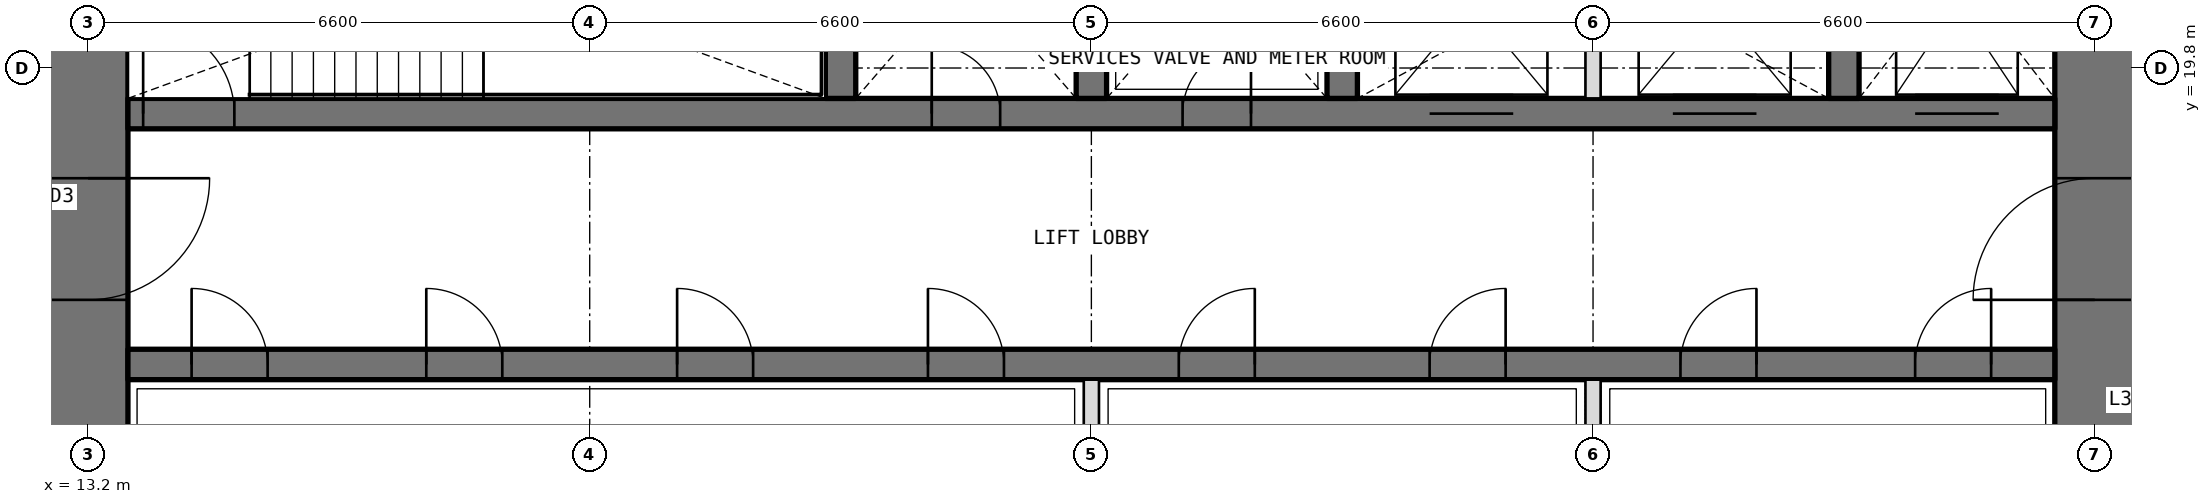
"""IFC4 building model, lengths in metres.
Left out: names, types, materials, properties, quantities, classifications, styles, units other than length and angle.
Written with IfcOpenShell. Run it as: python <this file> out.ifc"""

import sys

from ifc_helpers import new_model, si_unit, direction, frame, frame_2d, origin, place, context, subcontext, project, spatial, rectangle, extrude, element, fill, save


model = new_model("IFC4")
c1 = context("Model", 3, precision=1e-05, world=origin(), true_north=direction((0.0, 1.0)))
c2 = subcontext(c1, "Body", "Model", "MODEL_VIEW")
j1 = project(units=[si_unit("LENGTHUNIT", "METRE"), si_unit("PLANEANGLEUNIT", "RADIAN")], contexts=[c1])
p1 = place(None, origin())
s1 = spatial("IfcSite", under=j1, at=p1, CompositionType="ELEMENT")
p2 = place(p1, origin())
s2 = spatial("IfcBuilding", under=s1, at=p2, CompositionType="ELEMENT")
p3 = place(p2, frame((0.0, 0.0, 168.3)))
s3 = spatial("IfcBuildingStorey", under=s2, at=p3, CompositionType="ELEMENT", Elevation=168.3)
p4 = place(p3, frame((39.6, 13.725, 0.0), z_axis=(0.0, 0.0, 1.0), x_axis=(0.0, 1.0, 0.0)))
e1 = element("IfcWall", 1, at=p4, inside=s3, PredefinedType="SHEAR", context=c2, shape_type="SweptSolid", body=[
    extrude(rectangle(XDim=18.75, YDim=1.05, at=frame_2d((9.375, 0.0))), origin(), (0.0, 0.0, 1.0), 4.2),
])
p5 = place(p4, frame((3.025, 0.0, 0.0)))
e2 = element("IfcOpeningElement", 2, at=p5, cuts=e1, PredefinedType="OPENING", context=c2, shape_type="SweptSolid", body=[
    extrude(rectangle(XDim=1.6, YDim=2.1, at=frame_2d((0.8, 1.05))), frame((0.0, 0.535, 0.0), z_axis=(0.0, -1.0, 0.0), x_axis=(1.0, 0.0, 0.0)), (0.0, 0.0, 1.0), 1.07),
])
p6 = place(p4, frame((13.825, 0.0, 0.0)))
e3 = element("IfcOpeningElement", 3, at=p6, cuts=e1, PredefinedType="OPENING", context=c2, shape_type="SweptSolid", body=[
    extrude(rectangle(XDim=1.6, YDim=2.1, at=frame_2d((0.8, 1.05))), frame((0.0, 0.535, 0.0), z_axis=(0.0, -1.0, 0.0), x_axis=(1.0, 0.0, 0.0)), (0.0, 0.0, 1.0), 1.07),
])
p7 = place(p3, frame((13.2, 32.475, 0.0), z_axis=(0.0, 0.0, 1.0), x_axis=(0.0, -1.0, 0.0)))
e4 = element("IfcWall", 4, at=p7, inside=s3, PredefinedType="SHEAR", context=c2, shape_type="SweptSolid", body=[
    extrude(rectangle(XDim=18.75, YDim=1.05, at=frame_2d((9.375, 0.0))), origin(), (0.0, 0.0, 1.0), 4.2),
])
p8 = place(p7, frame((14.125, 0.0, 0.0)))
e5 = element("IfcOpeningElement", 5, at=p8, cuts=e4, PredefinedType="OPENING", context=c2, shape_type="SweptSolid", body=[
    extrude(rectangle(XDim=1.6, YDim=2.1, at=frame_2d((0.8, 1.05))), frame((0.0, 0.535, 0.0), z_axis=(0.0, -1.0, 0.0), x_axis=(1.0, 0.0, 0.0)), (0.0, 0.0, 1.0), 1.07),
])
p9 = place(p7, frame((3.325, 0.0, 0.0)))
e6 = element("IfcOpeningElement", 6, at=p9, cuts=e4, PredefinedType="OPENING", context=c2, shape_type="SweptSolid", body=[
    extrude(rectangle(XDim=1.6, YDim=2.1, at=frame_2d((0.8, 1.05))), frame((0.0, 0.535, 0.0), z_axis=(0.0, -1.0, 0.0), x_axis=(1.0, 0.0, 0.0)), (0.0, 0.0, 1.0), 1.07),
])
p10 = place(p3, frame((13.725, 15.9, 0.0), z_axis=(0.0, 0.0, 1.0), x_axis=(1.0, 0.0, 0.0)))
e7 = element("IfcWall", 7, at=p10, inside=s3, PredefinedType="SHEAR", context=c2, shape_type="SweptSolid", body=[
    extrude(rectangle(XDim=25.35, YDim=0.4, at=frame_2d((12.675, 0.0))), origin(), (0.0, 0.0, 1.0), 4.2),
])
p11 = place(p10, frame((0.837, 0.0, 0.0)))
e8 = element("IfcOpeningElement", 8, at=p11, cuts=e7, PredefinedType="OPENING", context=c2, shape_type="SweptSolid", body=[
    extrude(rectangle(XDim=1.0, YDim=2.1, at=frame_2d((0.5, 1.05))), frame((0.0, 0.21, 0.0), z_axis=(0.0, -1.0, 0.0), x_axis=(1.0, 0.0, 0.0)), (0.0, 0.0, 1.0), 0.42),
])
p12 = place(p10, frame((3.925, 0.0, 0.0)))
e9 = element("IfcOpeningElement", 9, at=p12, cuts=e7, PredefinedType="OPENING", context=c2, shape_type="SweptSolid", body=[
    extrude(rectangle(XDim=1.0, YDim=2.1, at=frame_2d((0.5, 1.05))), frame((0.0, 0.21, 0.0), z_axis=(0.0, -1.0, 0.0), x_axis=(1.0, 0.0, 0.0)), (0.0, 0.0, 1.0), 0.42),
])
p13 = place(p10, frame((7.225, 0.0, 0.0)))
e10 = element("IfcOpeningElement", 10, at=p13, cuts=e7, PredefinedType="OPENING", context=c2, shape_type="SweptSolid", body=[
    extrude(rectangle(XDim=1.0, YDim=2.1, at=frame_2d((0.5, 1.05))), frame((0.0, 0.21, 0.0), z_axis=(0.0, -1.0, 0.0), x_axis=(1.0, 0.0, 0.0)), (0.0, 0.0, 1.0), 0.42),
])
p14 = place(p10, frame((10.525, 0.0, 0.0)))
e11 = element("IfcOpeningElement", 11, at=p14, cuts=e7, PredefinedType="OPENING", context=c2, shape_type="SweptSolid", body=[
    extrude(rectangle(XDim=1.0, YDim=2.1, at=frame_2d((0.5, 1.05))), frame((0.0, 0.21, 0.0), z_axis=(0.0, -1.0, 0.0), x_axis=(1.0, 0.0, 0.0)), (0.0, 0.0, 1.0), 0.42),
])
p15 = place(p10, frame((13.825, 0.0, 0.0)))
e12 = element("IfcOpeningElement", 12, at=p15, cuts=e7, PredefinedType="OPENING", context=c2, shape_type="SweptSolid", body=[
    extrude(rectangle(XDim=1.0, YDim=2.1, at=frame_2d((0.5, 1.05))), frame((0.0, 0.21, 0.0), z_axis=(0.0, -1.0, 0.0), x_axis=(1.0, 0.0, 0.0)), (0.0, 0.0, 1.0), 0.42),
])
p16 = place(p10, frame((17.125, 0.0, 0.0)))
e13 = element("IfcOpeningElement", 13, at=p16, cuts=e7, PredefinedType="OPENING", context=c2, shape_type="SweptSolid", body=[
    extrude(rectangle(XDim=1.0, YDim=2.1, at=frame_2d((0.5, 1.05))), frame((0.0, 0.21, 0.0), z_axis=(0.0, -1.0, 0.0), x_axis=(1.0, 0.0, 0.0)), (0.0, 0.0, 1.0), 0.42),
])
p17 = place(p10, frame((20.425, 0.0, 0.0)))
e14 = element("IfcOpeningElement", 14, at=p17, cuts=e7, PredefinedType="OPENING", context=c2, shape_type="SweptSolid", body=[
    extrude(rectangle(XDim=1.0, YDim=2.1, at=frame_2d((0.5, 1.05))), frame((0.0, 0.21, 0.0), z_axis=(0.0, -1.0, 0.0), x_axis=(1.0, 0.0, 0.0)), (0.0, 0.0, 1.0), 0.42),
])
p18 = place(p10, frame((23.512, 0.0, 0.0)))
e15 = element("IfcOpeningElement", 15, at=p18, cuts=e7, PredefinedType="OPENING", context=c2, shape_type="SweptSolid", body=[
    extrude(rectangle(XDim=1.0, YDim=2.1, at=frame_2d((0.5, 1.05))), frame((0.0, 0.21, 0.0), z_axis=(0.0, -1.0, 0.0), x_axis=(1.0, 0.0, 0.0)), (0.0, 0.0, 1.0), 0.42),
])
p19 = place(p3, frame((13.725, 19.2, 0.0), z_axis=(0.0, 0.0, 1.0), x_axis=(1.0, 0.0, 0.0)))
e16 = element("IfcWall", 16, at=p19, inside=s3, PredefinedType="SHEAR", context=c2, shape_type="SweptSolid", body=[
    extrude(rectangle(XDim=25.35, YDim=0.4, at=frame_2d((12.675, 0.0))), origin(), (0.0, 0.0, 1.0), 4.2),
])
p20 = place(p19, frame((10.575, 0.0, 0.0)))
e17 = element("IfcOpeningElement", 17, at=p20, cuts=e16, PredefinedType="OPENING", context=c2, shape_type="SweptSolid", body=[
    extrude(rectangle(XDim=0.9, YDim=2.1, at=frame_2d((0.45, 1.05))), frame((0.0, 0.21, 0.0), z_axis=(0.0, -1.0, 0.0), x_axis=(1.0, 0.0, 0.0)), (0.0, 0.0, 1.0), 0.42),
])
p21 = place(p19, frame((13.875, 0.0, 0.0)))
e18 = element("IfcOpeningElement", 18, at=p21, cuts=e16, PredefinedType="OPENING", context=c2, shape_type="SweptSolid", body=[
    extrude(rectangle(XDim=0.9, YDim=2.1, at=frame_2d((0.45, 1.05))), frame((0.0, 0.21, 0.0), z_axis=(0.0, -1.0, 0.0), x_axis=(1.0, 0.0, 0.0)), (0.0, 0.0, 1.0), 0.42),
])
p22 = place(p19, frame((0.2, 0.0, 0.0)))
e19 = element("IfcOpeningElement", 19, at=p22, cuts=e16, PredefinedType="OPENING", context=c2, shape_type="SweptSolid", body=[
    extrude(rectangle(XDim=1.2, YDim=2.1, at=frame_2d((0.6, 1.05))), frame((0.0, 0.21, 0.0), z_axis=(0.0, -1.0, 0.0), x_axis=(1.0, 0.0, 0.0)), (0.0, 0.0, 1.0), 0.42),
])
p23 = place(p19, frame((23.512, 0.0, 0.0)))
e20 = element("IfcOpeningElement", 20, at=p23, cuts=e16, PredefinedType="OPENING", context=c2, shape_type="SweptSolid", body=[
    extrude(rectangle(XDim=1.1, YDim=2.1, at=frame_2d((0.55, 1.05))), frame((0.0, 0.21, 0.0), z_axis=(0.0, -1.0, 0.0), x_axis=(1.0, 0.0, 0.0)), (0.0, 0.0, 1.0), 0.42),
])
p24 = place(p19, frame((17.125, 0.0, 0.0)))
e21 = element("IfcOpeningElement", 21, at=p24, cuts=e16, PredefinedType="OPENING", context=c2, shape_type="SweptSolid", body=[
    extrude(rectangle(XDim=1.1, YDim=2.1, at=frame_2d((0.55, 1.05))), frame((0.0, 0.21, 0.0), z_axis=(0.0, -1.0, 0.0), x_axis=(1.0, 0.0, 0.0)), (0.0, 0.0, 1.0), 0.42),
])
p25 = place(p19, frame((20.325, 0.0, 0.0)))
e22 = element("IfcOpeningElement", 22, at=p25, cuts=e16, PredefinedType="OPENING", context=c2, shape_type="SweptSolid", body=[
    extrude(rectangle(XDim=1.1, YDim=2.1, at=frame_2d((0.55, 1.05))), frame((0.0, 0.21, 0.0), z_axis=(0.0, -1.0, 0.0), x_axis=(1.0, 0.0, 0.0)), (0.0, 0.0, 1.0), 0.42),
])
for number, where, z_axis, x_axis in (
    (23, (23.1, 19.4, 0.0), (0.0, 0.0, 1.0), (0.0, 1.0, 0.0)),
    (24, (26.4, 19.4, 0.0), (0.0, 0.0, 1.0), (0.0, 1.0, 0.0)),
    (25, (29.7, 19.4, 0.0), (0.0, 0.0, 1.0), (0.0, 1.0, 0.0)),
    (26, (36.3, 19.4, 0.0), (0.0, 0.0, 1.0), (0.0, 1.0, 0.0)),
):
    element("IfcWall", number, at=place(p3, frame(where, z_axis=z_axis, x_axis=x_axis)), inside=s3, PredefinedType="SHEAR", context=c2, shape_type="SweptSolid", body=[
        extrude(rectangle(XDim=3.35, YDim=0.4, at=frame_2d((1.675, 0.0))), origin(), (0.0, 0.0, 1.0), 4.2),
    ])
for number, where, z_axis, x_axis in (
    (27, (26.4, 13.725, 0.0), (0.0, 0.0, 1.0), (0.0, 1.0, 0.0)),
    (28, (33.0, 13.725, 0.0), (0.0, 0.0, 1.0), (0.0, 1.0, 0.0)),
):
    element("IfcWall", number, at=place(p3, frame(where, z_axis=z_axis, x_axis=x_axis)), inside=s3, PredefinedType="PARTITIONING", context=c2, shape_type="SweptSolid", body=[
        extrude(rectangle(XDim=1.975, YDim=0.2, at=frame_2d((0.987, 0.0))), origin(), (0.0, 0.0, 1.0), 4.2),
    ])
p26 = place(p3, frame((33.0, 19.4, 0.0), z_axis=(0.0, 0.0, 1.0), x_axis=(0.0, 1.0, 0.0)))
e29 = element("IfcWall", 29, at=p26, inside=s3, PredefinedType="PARTITIONING", context=c2, shape_type="SweptSolid", body=[
    extrude(rectangle(XDim=3.35, YDim=0.2, at=frame_2d((1.675, 0.0))), origin(), (0.0, 0.0, 1.0), 4.2),
])
p27 = place(p20, origin())
e30 = element("IfcDoor", 30, at=p27, inside=s3, OperationType="SINGLE_SWING_LEFT", PredefinedType="DOOR", context=c2, shape_type="SweptSolid", body=[
    extrude(rectangle(XDim=0.9, YDim=2.1, at=frame_2d((0.45, 1.05))), frame((0.0, 0.025, 0.0), z_axis=(0.0, -1.0, 0.0), x_axis=(1.0, 0.0, 0.0)), (0.0, 0.0, 1.0), 0.05),
])
fill(e17, e30)
p28 = place(p21, origin())
e31 = element("IfcDoor", 31, at=p28, inside=s3, OperationType="SINGLE_SWING_RIGHT", PredefinedType="DOOR", context=c2, shape_type="SweptSolid", body=[
    extrude(rectangle(XDim=0.9, YDim=2.1, at=frame_2d((0.45, 1.05))), frame((0.0, 0.025, 0.0), z_axis=(0.0, -1.0, 0.0), x_axis=(1.0, 0.0, 0.0)), (0.0, 0.0, 1.0), 0.05),
])
fill(e18, e31)
p29 = place(p11, origin())
e32 = element("IfcDoor", 32, at=p29, inside=s3, OperationType="SINGLE_SWING_LEFT", PredefinedType="DOOR", context=c2, shape_type="SweptSolid", body=[
    extrude(rectangle(XDim=1.0, YDim=2.1, at=frame_2d((0.5, 1.05))), frame((0.0, 0.025, 0.0), z_axis=(0.0, -1.0, 0.0), x_axis=(1.0, 0.0, 0.0)), (0.0, 0.0, 1.0), 0.05),
])
fill(e8, e32)
p30 = place(p12, origin())
e33 = element("IfcDoor", 33, at=p30, inside=s3, OperationType="SINGLE_SWING_LEFT", PredefinedType="DOOR", context=c2, shape_type="SweptSolid", body=[
    extrude(rectangle(XDim=1.0, YDim=2.1, at=frame_2d((0.5, 1.05))), frame((0.0, 0.025, 0.0), z_axis=(0.0, -1.0, 0.0), x_axis=(1.0, 0.0, 0.0)), (0.0, 0.0, 1.0), 0.05),
])
fill(e9, e33)
p31 = place(p13, origin())
e34 = element("IfcDoor", 34, at=p31, inside=s3, OperationType="SINGLE_SWING_LEFT", PredefinedType="DOOR", context=c2, shape_type="SweptSolid", body=[
    extrude(rectangle(XDim=1.0, YDim=2.1, at=frame_2d((0.5, 1.05))), frame((0.0, 0.025, 0.0), z_axis=(0.0, -1.0, 0.0), x_axis=(1.0, 0.0, 0.0)), (0.0, 0.0, 1.0), 0.05),
])
fill(e10, e34)
p32 = place(p14, origin())
e35 = element("IfcDoor", 35, at=p32, inside=s3, OperationType="SINGLE_SWING_LEFT", PredefinedType="DOOR", context=c2, shape_type="SweptSolid", body=[
    extrude(rectangle(XDim=1.0, YDim=2.1, at=frame_2d((0.5, 1.05))), frame((0.0, 0.025, 0.0), z_axis=(0.0, -1.0, 0.0), x_axis=(1.0, 0.0, 0.0)), (0.0, 0.0, 1.0), 0.05),
])
fill(e11, e35)
p33 = place(p15, origin())
e36 = element("IfcDoor", 36, at=p33, inside=s3, OperationType="SINGLE_SWING_RIGHT", PredefinedType="DOOR", context=c2, shape_type="SweptSolid", body=[
    extrude(rectangle(XDim=1.0, YDim=2.1, at=frame_2d((0.5, 1.05))), frame((0.0, 0.025, 0.0), z_axis=(0.0, -1.0, 0.0), x_axis=(1.0, 0.0, 0.0)), (0.0, 0.0, 1.0), 0.05),
])
fill(e12, e36)
p34 = place(p16, origin())
e37 = element("IfcDoor", 37, at=p34, inside=s3, OperationType="SINGLE_SWING_RIGHT", PredefinedType="DOOR", context=c2, shape_type="SweptSolid", body=[
    extrude(rectangle(XDim=1.0, YDim=2.1, at=frame_2d((0.5, 1.05))), frame((0.0, 0.025, 0.0), z_axis=(0.0, -1.0, 0.0), x_axis=(1.0, 0.0, 0.0)), (0.0, 0.0, 1.0), 0.05),
])
fill(e13, e37)
p35 = place(p17, origin())
e38 = element("IfcDoor", 38, at=p35, inside=s3, OperationType="SINGLE_SWING_RIGHT", PredefinedType="DOOR", context=c2, shape_type="SweptSolid", body=[
    extrude(rectangle(XDim=1.0, YDim=2.1, at=frame_2d((0.5, 1.05))), frame((0.0, 0.025, 0.0), z_axis=(0.0, -1.0, 0.0), x_axis=(1.0, 0.0, 0.0)), (0.0, 0.0, 1.0), 0.05),
])
fill(e14, e38)
p36 = place(p18, origin())
e39 = element("IfcDoor", 39, at=p36, inside=s3, OperationType="SINGLE_SWING_RIGHT", PredefinedType="DOOR", context=c2, shape_type="SweptSolid", body=[
    extrude(rectangle(XDim=1.0, YDim=2.1, at=frame_2d((0.5, 1.05))), frame((0.0, 0.025, 0.0), z_axis=(0.0, -1.0, 0.0), x_axis=(1.0, 0.0, 0.0)), (0.0, 0.0, 1.0), 0.05),
])
fill(e15, e39)
p37 = place(p22, origin())
e40 = element("IfcDoor", 40, at=p37, inside=s3, OperationType="SINGLE_SWING_LEFT", PredefinedType="DOOR", context=c2, shape_type="SweptSolid", body=[
    extrude(rectangle(XDim=1.2, YDim=2.1, at=frame_2d((0.6, 1.05))), frame((0.0, 0.025, 0.0), z_axis=(0.0, -1.0, 0.0), x_axis=(1.0, 0.0, 0.0)), (0.0, 0.0, 1.0), 0.05),
])
fill(e19, e40)
p38 = place(p8, origin())
e41 = element("IfcDoor", 41, at=p38, inside=s3, OperationType="DOUBLE_DOOR_DOUBLE_SWING", PredefinedType="DOOR", context=c2, shape_type="SweptSolid", body=[
    extrude(rectangle(XDim=1.6, YDim=2.1, at=frame_2d((0.8, 1.05))), frame((0.0, 0.025, 0.0), z_axis=(0.0, -1.0, 0.0), x_axis=(1.0, 0.0, 0.0)), (0.0, 0.0, 1.0), 0.05),
])
fill(e5, e41)
p39 = place(p5, origin())
e42 = element("IfcDoor", 42, at=p39, inside=s3, OperationType="DOUBLE_DOOR_DOUBLE_SWING", PredefinedType="DOOR", context=c2, shape_type="SweptSolid", body=[
    extrude(rectangle(XDim=1.6, YDim=2.1, at=frame_2d((0.8, 1.05))), frame((0.0, 0.025, 0.0), z_axis=(0.0, -1.0, 0.0), x_axis=(1.0, 0.0, 0.0)), (0.0, 0.0, 1.0), 0.05),
])
fill(e2, e42)
p40 = place(p23, origin())
e43 = element("IfcDoor", 43, at=p40, inside=s3, OperationType="DOUBLE_DOOR_SLIDING", PredefinedType="DOOR", context=c2, shape_type="SweptSolid", body=[
    extrude(rectangle(XDim=1.1, YDim=2.1, at=frame_2d((0.55, 1.05))), frame((0.0, 0.025, 0.0), z_axis=(0.0, -1.0, 0.0), x_axis=(1.0, 0.0, 0.0)), (0.0, 0.0, 1.0), 0.05),
])
fill(e20, e43)
p41 = place(p24, origin())
e44 = element("IfcDoor", 44, at=p41, inside=s3, OperationType="DOUBLE_DOOR_SLIDING", PredefinedType="DOOR", context=c2, shape_type="SweptSolid", body=[
    extrude(rectangle(XDim=1.1, YDim=2.1, at=frame_2d((0.55, 1.05))), frame((0.0, 0.025, 0.0), z_axis=(0.0, -1.0, 0.0), x_axis=(1.0, 0.0, 0.0)), (0.0, 0.0, 1.0), 0.05),
])
fill(e21, e44)
p42 = place(p25, origin())
e45 = element("IfcDoor", 45, at=p42, inside=s3, OperationType="DOUBLE_DOOR_SLIDING", PredefinedType="DOOR", context=c2, shape_type="SweptSolid", body=[
    extrude(rectangle(XDim=1.1, YDim=2.1, at=frame_2d((0.55, 1.05))), frame((0.0, 0.025, 0.0), z_axis=(0.0, -1.0, 0.0), x_axis=(1.0, 0.0, 0.0)), (0.0, 0.0, 1.0), 0.05),
])
fill(e22, e45)
save(model, sys.argv[1])
